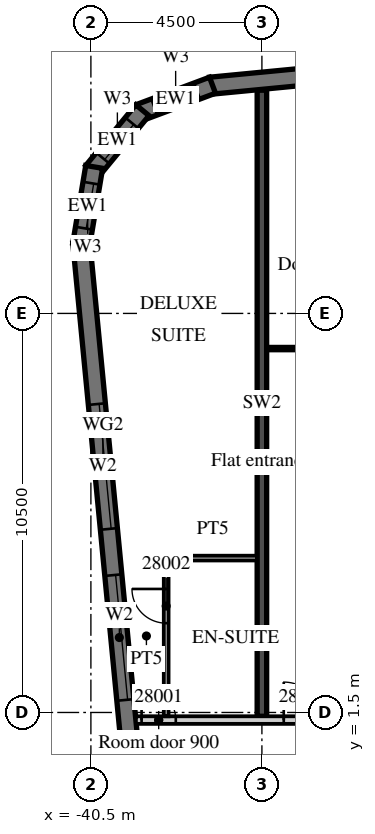
"""IFC4 building model, lengths in metres.
Left out: names, types, materials, properties, quantities, classifications, styles, units other than length and angle.
Written with IfcOpenShell. Run it as: python <this file> out.ifc"""

import sys

from ifc_helpers import new_model, si_unit, direction, frame, frame_2d, origin, place, context, subcontext, project, spatial, polyline, rectangle, outline, extrude, element, fill, save


model = new_model("IFC4")
c1 = context("Model", 3, precision=1e-05, world=origin(), true_north=direction((0.0, 1.0)))
c2 = subcontext(c1, "Body", "Model", "MODEL_VIEW")
j1 = project(units=[si_unit("LENGTHUNIT", "METRE"), si_unit("PLANEANGLEUNIT", "RADIAN")], contexts=[c1])
p1 = place(None, origin())
s1 = spatial("IfcSite", under=j1, at=p1, CompositionType="ELEMENT")
p2 = place(p1, origin())
s2 = spatial("IfcBuilding", under=s1, at=p2, CompositionType="ELEMENT")
p3 = place(p2, frame((0.0, 0.0, 127.3)))
s3 = spatial("IfcBuildingStorey", under=s2, at=p3, CompositionType="ELEMENT", Elevation=127.3)
p4 = place(p3, frame((-36.0, 1.4, 0.0), z_axis=(0.0, 0.0, 1.0), x_axis=(0.0, 1.0, 0.0)))
e1 = element("IfcWall", 1, at=p4, inside=s3, PredefinedType="SHEAR", context=c2, shape_type="SweptSolid", body=[
    extrude(rectangle(XDim=16.474, YDim=0.25, at=frame_2d((8.237, 0.0))), origin(), (0.0, 0.0, 1.0), 3.3),
])
p5 = place(p3, frame((-40.753, 13.872, 0.0), z_axis=(0.0, 0.0, 1.0), x_axis=(0.095843327381, -0.995396431878, 0.0)))
e2 = element("IfcWall", 2, at=p5, inside=s3, PredefinedType="SOLIDWALL", context=c2, shape_type="SweptSolid", body=[
    extrude(rectangle(XDim=35.0, YDim=0.45, at=frame_2d((17.5, 0.0))), origin(), (0.0, 0.0, 1.0), 3.02),
])
p6 = place(p5, frame((4.277, 0.0, 0.45)))
e3 = element("IfcOpeningElement", 3, at=p6, cuts=e2, PredefinedType="OPENING", context=c2, shape_type="SweptSolid", body=[
    extrude(rectangle(XDim=3.3, YDim=2.25, at=frame_2d((1.65, 1.125))), frame((0.0, 0.235, 0.0), z_axis=(0.0, -1.0, 0.0), x_axis=(1.0, 0.0, 0.0)), (0.0, 0.0, 1.0), 0.47),
])
p7 = place(p5, frame((8.798, 0.0, 0.45)))
e4 = element("IfcOpeningElement", 4, at=p7, cuts=e2, PredefinedType="OPENING", context=c2, shape_type="SweptSolid", body=[
    extrude(rectangle(XDim=3.3, YDim=2.25, at=frame_2d((1.65, 1.125))), frame((0.0, 0.235, 0.0), z_axis=(0.0, -1.0, 0.0), x_axis=(1.0, 0.0, 0.0)), (0.0, 0.0, 1.0), 0.47),
])
p8 = place(p3, frame((13.521, 22.89, 0.0), z_axis=(0.0, 0.0, 1.0), x_axis=(-0.995396445054, -0.095843190545, 0.0)))
e5 = element("IfcWall", 5, at=p8, inside=s3, PredefinedType="SOLIDWALL", context=c2, shape_type="SweptSolid", body=[
    extrude(rectangle(XDim=51.114, YDim=0.45, at=frame_2d((25.557, 0.0))), origin(), (0.0, 0.0, 1.0), 3.02),
])
p9 = place(p8, frame((0.91, 0.0, 0.45)))
e6 = element("IfcOpeningElement", 6, at=p9, cuts=e5, PredefinedType="OPENING", context=c2, shape_type="SweptSolid", body=[
    extrude(rectangle(XDim=2.7, YDim=2.25, at=frame_2d((1.35, 1.125))), frame((0.0, 0.235, 0.0), z_axis=(0.0, -1.0, 0.0), x_axis=(1.0, 0.0, 0.0)), (0.0, 0.0, 1.0), 0.47),
])
p10 = place(p8, frame((5.431, 0.0, 0.45)))
e7 = element("IfcOpeningElement", 7, at=p10, cuts=e5, PredefinedType="OPENING", context=c2, shape_type="SweptSolid", body=[
    extrude(rectangle(XDim=2.7, YDim=2.25, at=frame_2d((1.35, 1.125))), frame((0.0, 0.235, 0.0), z_axis=(0.0, -1.0, 0.0), x_axis=(1.0, 0.0, 0.0)), (0.0, 0.0, 1.0), 0.47),
])
p11 = place(p8, frame((9.952, 0.0, 0.45)))
e8 = element("IfcOpeningElement", 8, at=p11, cuts=e5, PredefinedType="OPENING", context=c2, shape_type="SweptSolid", body=[
    extrude(rectangle(XDim=2.7, YDim=2.25, at=frame_2d((1.35, 1.125))), frame((0.0, 0.235, 0.0), z_axis=(0.0, -1.0, 0.0), x_axis=(1.0, 0.0, 0.0)), (0.0, 0.0, 1.0), 0.47),
])
p12 = place(p8, frame((14.473, 0.0, 0.45)))
e9 = element("IfcOpeningElement", 9, at=p12, cuts=e5, PredefinedType="OPENING", context=c2, shape_type="SweptSolid", body=[
    extrude(rectangle(XDim=2.7, YDim=2.25, at=frame_2d((1.35, 1.125))), frame((0.0, 0.235, 0.0), z_axis=(0.0, -1.0, 0.0), x_axis=(1.0, 0.0, 0.0)), (0.0, 0.0, 1.0), 0.47),
])
p13 = place(p8, frame((18.994, 0.0, 0.45)))
e10 = element("IfcOpeningElement", 10, at=p13, cuts=e5, PredefinedType="OPENING", context=c2, shape_type="SweptSolid", body=[
    extrude(rectangle(XDim=2.7, YDim=2.25, at=frame_2d((1.35, 1.125))), frame((0.0, 0.235, 0.0), z_axis=(0.0, -1.0, 0.0), x_axis=(1.0, 0.0, 0.0)), (0.0, 0.0, 1.0), 0.47),
])
p14 = place(p8, frame((23.514, 0.0, 0.45)))
e11 = element("IfcOpeningElement", 11, at=p14, cuts=e5, PredefinedType="OPENING", context=c2, shape_type="SweptSolid", body=[
    extrude(rectangle(XDim=2.7, YDim=2.25, at=frame_2d((1.35, 1.125))), frame((0.0, 0.235, 0.0), z_axis=(0.0, -1.0, 0.0), x_axis=(1.0, 0.0, 0.0)), (0.0, 0.0, 1.0), 0.47),
])
p15 = place(p8, frame((28.035, 0.0, 0.45)))
e12 = element("IfcOpeningElement", 12, at=p15, cuts=e5, PredefinedType="OPENING", context=c2, shape_type="SweptSolid", body=[
    extrude(rectangle(XDim=2.7, YDim=2.25, at=frame_2d((1.35, 1.125))), frame((0.0, 0.235, 0.0), z_axis=(0.0, -1.0, 0.0), x_axis=(1.0, 0.0, 0.0)), (0.0, 0.0, 1.0), 0.47),
])
p16 = place(p8, frame((32.556, 0.0, 0.45)))
e13 = element("IfcOpeningElement", 13, at=p16, cuts=e5, PredefinedType="OPENING", context=c2, shape_type="SweptSolid", body=[
    extrude(rectangle(XDim=2.7, YDim=2.25, at=frame_2d((1.35, 1.125))), frame((0.0, 0.235, 0.0), z_axis=(0.0, -1.0, 0.0), x_axis=(1.0, 0.0, 0.0)), (0.0, 0.0, 1.0), 0.47),
])
p17 = place(p8, frame((37.077, 0.0, 0.45)))
e14 = element("IfcOpeningElement", 14, at=p17, cuts=e5, PredefinedType="OPENING", context=c2, shape_type="SweptSolid", body=[
    extrude(rectangle(XDim=2.7, YDim=2.25, at=frame_2d((1.35, 1.125))), frame((0.0, 0.235, 0.0), z_axis=(0.0, -1.0, 0.0), x_axis=(1.0, 0.0, 0.0)), (0.0, 0.0, 1.0), 0.47),
])
p18 = place(p8, frame((41.598, 0.0, 0.45)))
e15 = element("IfcOpeningElement", 15, at=p18, cuts=e5, PredefinedType="OPENING", context=c2, shape_type="SweptSolid", body=[
    extrude(rectangle(XDim=2.7, YDim=2.25, at=frame_2d((1.35, 1.125))), frame((0.0, 0.235, 0.0), z_axis=(0.0, -1.0, 0.0), x_axis=(1.0, 0.0, 0.0)), (0.0, 0.0, 1.0), 0.47),
])
p19 = place(p8, frame((46.118, 0.0, 0.45)))
e16 = element("IfcOpeningElement", 16, at=p19, cuts=e5, PredefinedType="OPENING", context=c2, shape_type="SweptSolid", body=[
    extrude(rectangle(XDim=2.7, YDim=2.25, at=frame_2d((1.35, 1.125))), frame((0.0, 0.235, 0.0), z_axis=(0.0, -1.0, 0.0), x_axis=(1.0, 0.0, 0.0)), (0.0, 0.0, 1.0), 0.47),
])
p20 = place(p3, frame((-37.3, 18.004, 0.0), z_axis=(0.0, 0.0, 1.0), x_axis=(-0.936677599948, -0.350192909346, 0.0)))
e17 = element("IfcWall", 17, at=p20, inside=s3, PredefinedType="SOLIDWALL", context=c2, shape_type="SweptSolid", body=[
    extrude(outline(polyline([(0.0, -0.225), (2.071, -0.225), (1.95, 0.225), (0.121, 0.225), (0.0, -0.225)])), origin(), (0.0, 0.0, 1.0), 3.02),
])
p21 = place(p20, frame((0.435, 0.0, 0.45)))
e18 = element("IfcOpeningElement", 18, at=p21, cuts=e17, PredefinedType="OPENING", context=c2, shape_type="SweptSolid", body=[
    extrude(rectangle(XDim=1.2, YDim=2.25, at=frame_2d((0.6, 1.125))), frame((0.0, 0.235, 0.0), z_axis=(0.0, -1.0, 0.0), x_axis=(1.0, 0.0, 0.0)), (0.0, 0.0, 1.0), 0.47),
])
p22 = place(p3, frame((-39.145, 17.347, 0.0), z_axis=(0.0, 0.0, 1.0), x_axis=(-0.636046112757, -0.771651049663, 0.0)))
e19 = element("IfcWall", 19, at=p22, inside=s3, PredefinedType="SOLIDWALL", context=c2, shape_type="SweptSolid", body=[
    extrude(outline(polyline([(0.0, -0.225), (2.071, -0.225), (1.95, 0.225), (0.121, 0.225), (0.0, -0.225)])), origin(), (0.0, 0.0, 1.0), 3.02),
])
p23 = place(p22, frame((0.435, 0.0, 0.45)))
e20 = element("IfcOpeningElement", 20, at=p23, cuts=e19, PredefinedType="OPENING", context=c2, shape_type="SweptSolid", body=[
    extrude(rectangle(XDim=1.2, YDim=2.25, at=frame_2d((0.6, 1.125))), frame((0.0, 0.235, 0.0), z_axis=(0.0, -1.0, 0.0), x_axis=(1.0, 0.0, 0.0)), (0.0, 0.0, 1.0), 0.47),
])
p24 = place(p3, frame((-40.413, 15.855, 0.0), z_axis=(0.0, 0.0, 1.0), x_axis=(-0.165068144653, -0.986282164302, 0.0)))
e21 = element("IfcWall", 21, at=p24, inside=s3, PredefinedType="SOLIDWALL", context=c2, shape_type="SweptSolid", body=[
    extrude(outline(polyline([(0.0, -0.225), (2.071, -0.225), (1.95, 0.225), (0.121, 0.225), (0.0, -0.225)])), origin(), (0.0, 0.0, 1.0), 3.02),
])
p25 = place(p24, frame((0.435, 0.0, 0.45)))
e22 = element("IfcOpeningElement", 22, at=p25, cuts=e21, PredefinedType="OPENING", context=c2, shape_type="SweptSolid", body=[
    extrude(rectangle(XDim=1.2, YDim=2.25, at=frame_2d((0.6, 1.125))), frame((0.0, 0.235, 0.0), z_axis=(0.0, -1.0, 0.0), x_axis=(1.0, 0.0, 0.0)), (0.0, 0.0, 1.0), 0.47),
])
p26 = place(p3, frame((-39.316, 1.3, 0.0), z_axis=(0.0, 0.0, 1.0), x_axis=(1.0, 0.0, 0.0)))
e23 = element("IfcWall", 23, at=p26, inside=s3, PredefinedType="PARTITIONING", context=c2, shape_type="SweptSolid", body=[
    extrude(rectangle(XDim=52.816, YDim=0.2, at=frame_2d((26.408, 0.0))), origin(), (0.0, 0.0, 1.0), 3.02),
])
p27 = place(p26, frame((0.15, 0.0, 0.0)))
e24 = element("IfcOpeningElement", 24, at=p27, cuts=e23, PredefinedType="OPENING", context=c2, shape_type="SweptSolid", body=[
    extrude(rectangle(XDim=0.9, YDim=2.1, at=frame_2d((0.45, 1.05))), frame((0.0, 0.11, 0.0), z_axis=(0.0, -1.0, 0.0), x_axis=(1.0, 0.0, 0.0)), (0.0, 0.0, 1.0), 0.22),
])
p28 = place(p26, frame((3.891, 0.0, 0.0)))
e25 = element("IfcOpeningElement", 25, at=p28, cuts=e23, PredefinedType="OPENING", context=c2, shape_type="SweptSolid", body=[
    extrude(rectangle(XDim=1.0, YDim=2.1, at=frame_2d((0.5, 1.05))), frame((0.0, 0.11, 0.0), z_axis=(0.0, -1.0, 0.0), x_axis=(1.0, 0.0, 0.0)), (0.0, 0.0, 1.0), 0.22),
])
p29 = place(p26, frame((10.741, 0.0, 0.0)))
e26 = element("IfcOpeningElement", 26, at=p29, cuts=e23, PredefinedType="OPENING", context=c2, shape_type="SweptSolid", body=[
    extrude(rectangle(XDim=1.0, YDim=2.1, at=frame_2d((0.5, 1.05))), frame((0.0, 0.11, 0.0), z_axis=(0.0, -1.0, 0.0), x_axis=(1.0, 0.0, 0.0)), (0.0, 0.0, 1.0), 0.22),
])
p30 = place(p26, frame((15.266, 0.0, 0.0)))
e27 = element("IfcOpeningElement", 27, at=p30, cuts=e23, PredefinedType="OPENING", context=c2, shape_type="SweptSolid", body=[
    extrude(rectangle(XDim=1.0, YDim=2.1, at=frame_2d((0.5, 1.05))), frame((0.0, 0.11, 0.0), z_axis=(0.0, -1.0, 0.0), x_axis=(1.0, 0.0, 0.0)), (0.0, 0.0, 1.0), 0.22),
])
p31 = place(p26, frame((19.741, 0.0, 0.0)))
e28 = element("IfcOpeningElement", 28, at=p31, cuts=e23, PredefinedType="OPENING", context=c2, shape_type="SweptSolid", body=[
    extrude(rectangle(XDim=1.0, YDim=2.1, at=frame_2d((0.5, 1.05))), frame((0.0, 0.11, 0.0), z_axis=(0.0, -1.0, 0.0), x_axis=(1.0, 0.0, 0.0)), (0.0, 0.0, 1.0), 0.22),
])
p32 = place(p26, frame((26.678, 0.0, 0.0)))
e29 = element("IfcOpeningElement", 29, at=p32, cuts=e23, PredefinedType="OPENING", context=c2, shape_type="SweptSolid", body=[
    extrude(rectangle(XDim=1.2, YDim=2.1, at=frame_2d((0.6, 1.05))), frame((0.0, 0.11, 0.0), z_axis=(0.0, -1.0, 0.0), x_axis=(1.0, 0.0, 0.0)), (0.0, 0.0, 1.0), 0.22),
])
p33 = place(p26, frame((35.678, 0.0, 0.0)))
e30 = element("IfcOpeningElement", 30, at=p33, cuts=e23, PredefinedType="OPENING", context=c2, shape_type="SweptSolid", body=[
    extrude(rectangle(XDim=1.2, YDim=2.1, at=frame_2d((0.6, 1.05))), frame((0.0, 0.11, 0.0), z_axis=(0.0, -1.0, 0.0), x_axis=(1.0, 0.0, 0.0)), (0.0, 0.0, 1.0), 0.22),
])
p34 = place(p26, frame((41.754, 0.0, 0.0)))
e31 = element("IfcOpeningElement", 31, at=p34, cuts=e23, PredefinedType="OPENING", context=c2, shape_type="SweptSolid", body=[
    extrude(rectangle(XDim=1.2, YDim=2.1, at=frame_2d((0.6, 1.05))), frame((0.0, 0.11, 0.0), z_axis=(0.0, -1.0, 0.0), x_axis=(1.0, 0.0, 0.0)), (0.0, 0.0, 1.0), 0.22),
])
p35 = place(p26, frame((51.241, 0.0, 0.0)))
e32 = element("IfcOpeningElement", 32, at=p35, cuts=e23, PredefinedType="OPENING", context=c2, shape_type="SweptSolid", body=[
    extrude(rectangle(XDim=1.0, YDim=2.1, at=frame_2d((0.5, 1.05))), frame((0.0, 0.11, 0.0), z_axis=(0.0, -1.0, 0.0), x_axis=(1.0, 0.0, 0.0)), (0.0, 0.0, 1.0), 0.22),
])
p36 = place(p3, frame((-38.519, 1.4, 0.0), z_axis=(0.0, 0.0, 1.0), x_axis=(0.0, 1.0, 0.0)))
e33 = element("IfcWall", 33, at=p36, inside=s3, PredefinedType="PARTITIONING", context=c2, shape_type="SweptSolid", body=[
    extrude(rectangle(XDim=4.225, YDim=0.125, at=frame_2d((2.113, 0.0))), origin(), (0.0, 0.0, 1.0), 3.02),
])
p37 = place(p36, frame((2.45, 0.0, 0.0)))
e34 = element("IfcOpeningElement", 34, at=p37, cuts=e33, PredefinedType="OPENING", context=c2, shape_type="SweptSolid", body=[
    extrude(rectangle(XDim=0.9, YDim=2.1, at=frame_2d((0.45, 1.05))), frame((0.0, 0.073, 0.0), z_axis=(0.0, -1.0, 0.0), x_axis=(1.0, 0.0, 0.0)), (0.0, 0.0, 1.0), 0.145),
])
p38 = place(p3, frame((-38.457, 5.562, 0.0), z_axis=(0.0, 0.0, 1.0), x_axis=(1.0, 0.0, 0.0)))
e35 = element("IfcWall", 35, at=p38, inside=s3, PredefinedType="PARTITIONING", context=c2, shape_type="SweptSolid", body=[
    extrude(rectangle(XDim=2.332, YDim=0.125, at=frame_2d((1.166, 0.0))), origin(), (0.0, 0.0, 1.0), 3.02),
])
p39 = place(p3, frame((-35.875, 11.075, 0.0), z_axis=(0.0, 0.0, 1.0), x_axis=(1.0, 0.0, 0.0)))
e36 = element("IfcWall", 36, at=p39, inside=s3, PredefinedType="PARTITIONING", context=c2, shape_type="SweptSolid", body=[
    extrude(rectangle(XDim=4.275, YDim=0.1, at=frame_2d((2.137, 0.0))), origin(), (0.0, 0.0, 1.0), 3.02),
])
p40 = place(p39, frame((1.388, 0.0, 0.0)))
e37 = element("IfcOpeningElement", 37, at=p40, cuts=e36, PredefinedType="OPENING", context=c2, shape_type="SweptSolid", body=[
    extrude(rectangle(XDim=1.5, YDim=2.1, at=frame_2d((0.75, 1.05))), frame((0.0, 0.06, 0.0), z_axis=(0.0, -1.0, 0.0), x_axis=(1.0, 0.0, 0.0)), (0.0, 0.0, 1.0), 0.12),
])
p41 = place(p6, origin())
e38 = element("IfcWindow", 38, at=p41, inside=s3, PartitioningType="SINGLE_PANEL", PredefinedType="WINDOW", context=c2, shape_type="SweptSolid", body=[
    extrude(rectangle(XDim=3.3, YDim=2.25, at=frame_2d((1.65, 1.125))), frame((0.0, 0.09, 0.0), z_axis=(0.0, -1.0, 0.0), x_axis=(1.0, 0.0, 0.0)), (0.0, 0.0, 1.0), 0.06),
])
fill(e3, e38)
p42 = place(p7, origin())
e39 = element("IfcWindow", 39, at=p42, inside=s3, PartitioningType="SINGLE_PANEL", PredefinedType="WINDOW", context=c2, shape_type="SweptSolid", body=[
    extrude(rectangle(XDim=3.3, YDim=2.25, at=frame_2d((1.65, 1.125))), frame((0.0, 0.09, 0.0), z_axis=(0.0, -1.0, 0.0), x_axis=(1.0, 0.0, 0.0)), (0.0, 0.0, 1.0), 0.06),
])
fill(e4, e39)
p43 = place(p21, origin())
e40 = element("IfcWindow", 40, at=p43, inside=s3, PartitioningType="SINGLE_PANEL", PredefinedType="WINDOW", context=c2, shape_type="SweptSolid", body=[
    extrude(rectangle(XDim=1.2, YDim=2.25, at=frame_2d((0.6, 1.125))), frame((0.0, 0.09, 0.0), z_axis=(0.0, -1.0, 0.0), x_axis=(1.0, 0.0, 0.0)), (0.0, 0.0, 1.0), 0.06),
])
fill(e18, e40)
p44 = place(p23, origin())
e41 = element("IfcWindow", 41, at=p44, inside=s3, PartitioningType="SINGLE_PANEL", PredefinedType="WINDOW", context=c2, shape_type="SweptSolid", body=[
    extrude(rectangle(XDim=1.2, YDim=2.25, at=frame_2d((0.6, 1.125))), frame((0.0, 0.09, 0.0), z_axis=(0.0, -1.0, 0.0), x_axis=(1.0, 0.0, 0.0)), (0.0, 0.0, 1.0), 0.06),
])
fill(e20, e41)
p45 = place(p25, origin())
e42 = element("IfcWindow", 42, at=p45, inside=s3, PartitioningType="SINGLE_PANEL", PredefinedType="WINDOW", context=c2, shape_type="SweptSolid", body=[
    extrude(rectangle(XDim=1.2, YDim=2.25, at=frame_2d((0.6, 1.125))), frame((0.0, 0.09, 0.0), z_axis=(0.0, -1.0, 0.0), x_axis=(1.0, 0.0, 0.0)), (0.0, 0.0, 1.0), 0.06),
])
fill(e22, e42)
p46 = place(p27, origin())
e43 = element("IfcDoor", 43, at=p46, inside=s3, OperationType="SINGLE_SWING_LEFT", PredefinedType="DOOR", context=c2, shape_type="SweptSolid", body=[
    extrude(rectangle(XDim=0.9, YDim=2.1, at=frame_2d((0.45, 1.05))), frame((0.0, 0.025, 0.0), z_axis=(0.0, -1.0, 0.0), x_axis=(1.0, 0.0, 0.0)), (0.0, 0.0, 1.0), 0.05),
])
fill(e24, e43)
p47 = place(p37, origin())
e44 = element("IfcDoor", 44, at=p47, inside=s3, OperationType="SINGLE_SWING_RIGHT", PredefinedType="DOOR", context=c2, shape_type="SweptSolid", body=[
    extrude(rectangle(XDim=0.9, YDim=2.1, at=frame_2d((0.45, 1.05))), frame((0.0, 0.025, 0.0), z_axis=(0.0, -1.0, 0.0), x_axis=(1.0, 0.0, 0.0)), (0.0, 0.0, 1.0), 0.05),
])
fill(e34, e44)
p48 = place(p28, origin())
e45 = element("IfcDoor", 45, at=p48, inside=s3, OperationType="SINGLE_SWING_LEFT", PredefinedType="DOOR", context=c2, shape_type="SweptSolid", body=[
    extrude(rectangle(XDim=1.0, YDim=2.1, at=frame_2d((0.5, 1.05))), frame((0.0, 0.025, 0.0), z_axis=(0.0, -1.0, 0.0), x_axis=(1.0, 0.0, 0.0)), (0.0, 0.0, 1.0), 0.05),
])
fill(e25, e45)
save(model, sys.argv[1])
